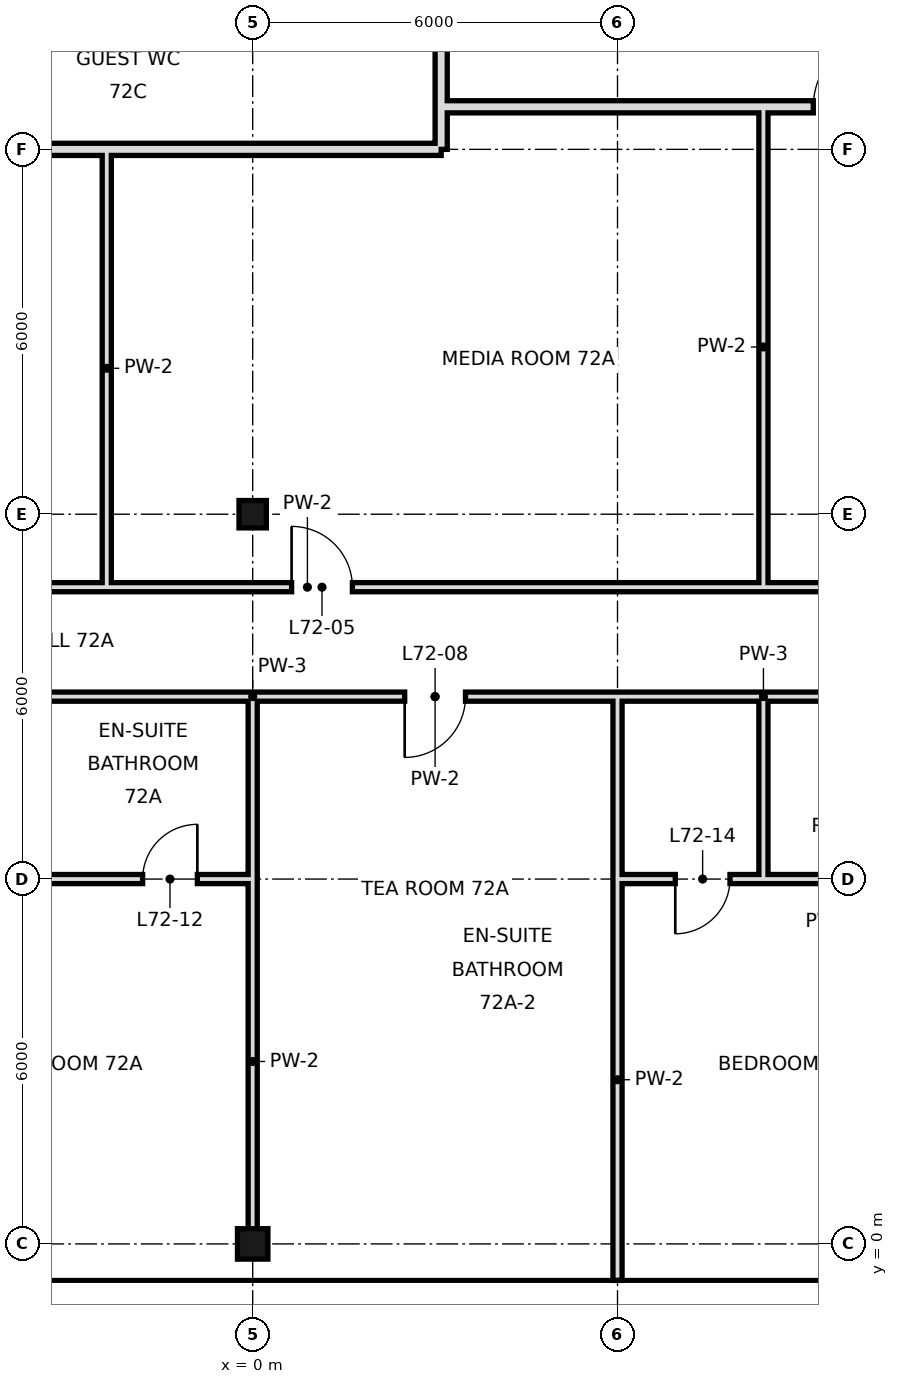
"""IFC4 building model, lengths in metres.
Left out: names, types, materials, properties, quantities, classifications, styles, units other than length and angle.
Written with IfcOpenShell. Run it as: python <this file> out.ifc"""

import sys

from ifc_helpers import new_model, si_unit, direction, frame, frame_2d, origin, origin_with_axes, origin_2d, place, context, subcontext, project, spatial, rectangle, hollow_rectangle, extrude, element, fill, save


model = new_model("IFC4")
c1 = context("Model", 3, precision=1e-05, world=origin(), true_north=direction((0.0, 1.0)))
c2 = subcontext(c1, "Body", "Model", "MODEL_VIEW")
j1 = project(units=[si_unit("LENGTHUNIT", "METRE"), si_unit("PLANEANGLEUNIT", "RADIAN")], contexts=[c1])
p1 = place(None, origin())
s1 = spatial("IfcSite", under=j1, at=p1, CompositionType="ELEMENT")
p2 = place(p1, origin())
s2 = spatial("IfcBuilding", under=s1, at=p2, CompositionType="ELEMENT")
p3 = place(p2, frame((0.0, 0.0, 305.2)))
s3 = spatial("IfcBuildingStorey", under=s2, at=p3, CompositionType="ELEMENT", Elevation=305.2)
p4 = place(p3, origin_with_axes())
e1 = element("IfcColumn", 1, at=p4, inside=s3, PredefinedType="COLUMN", context=c2, shape_type="SweptSolid", body=[
    extrude(hollow_rectangle(XDim=0.5, YDim=0.5, WallThickness=0.025, at=origin_2d()), origin(), (0.0, 0.0, 1.0), 3.6),
])
p5 = place(p3, frame((0.0, 12.0, 0.0), z_axis=(0.0, 0.0, 1.0), x_axis=(1.0, 0.0, 0.0)))
e2 = element("IfcColumn", 2, at=p5, inside=s3, PredefinedType="COLUMN", context=c2, shape_type="SweptSolid", body=[
    extrude(hollow_rectangle(XDim=0.45, YDim=0.45, WallThickness=0.022, at=origin_2d()), origin(), (0.0, 0.0, 1.0), 3.6),
])
p6 = place(p3, frame((-2.4, 10.8, 0.0), z_axis=(0.0, 0.0, 1.0), x_axis=(0.0, 1.0, 0.0)))
e3 = element("IfcWall", 3, at=p6, inside=s3, PredefinedType="PARTITIONING", context=c2, shape_type="SweptSolid", body=[
    extrude(rectangle(XDim=7.2, YDim=0.15, at=frame_2d((3.6, 0.0))), origin(), (0.0, 0.0, 1.0), 3.42),
])
p7 = place(p3, frame((0.0, 0.0, 0.0), z_axis=(0.0, 0.0, 1.0), x_axis=(0.0, 1.0, 0.0)))
e4 = element("IfcWall", 4, at=p7, inside=s3, PredefinedType="PARTITIONING", context=c2, shape_type="SweptSolid", body=[
    extrude(rectangle(XDim=6.0, YDim=0.15, at=frame_2d((3.0, 0.0))), origin(), (0.0, 0.0, 1.0), 2.72),
])
p8 = place(p3, frame((0.0, 6.0, 0.0), z_axis=(0.0, 0.0, 1.0), x_axis=(0.0, 1.0, 0.0)))
e5 = element("IfcWall", 5, at=p8, inside=s3, PredefinedType="PARTITIONING", context=c2, shape_type="SweptSolid", body=[
    extrude(rectangle(XDim=3.0, YDim=0.15, at=frame_2d((1.5, 0.0))), origin(), (0.0, 0.0, 1.0), 2.72),
])
p9 = place(p3, frame((3.1, 18.7, 0.0), z_axis=(0.0, 0.0, 1.0), x_axis=(0.0, 1.0, 0.0)))
e6 = element("IfcWall", 6, at=p9, inside=s3, PredefinedType="SOLIDWALL", context=c2, shape_type="SweptSolid", body=[
    extrude(rectangle(XDim=1.7, YDim=0.2, at=frame_2d((0.85, 0.0))), origin(), (0.0, 0.0, 1.0), 3.42),
])
p10 = place(p3, frame((3.1, 18.0, 0.0), z_axis=(0.0, 0.0, 1.0), x_axis=(0.0, 1.0, 0.0)))
e7 = element("IfcWall", 7, at=p10, inside=s3, PredefinedType="SOLIDWALL", context=c2, shape_type="SweptSolid", body=[
    extrude(rectangle(XDim=0.7, YDim=0.2, at=frame_2d((0.35, 0.0))), origin(), (0.0, 0.0, 1.0), 2.97),
])
p11 = place(p3, frame((6.0, -0.6, 0.0), z_axis=(0.0, 0.0, 1.0), x_axis=(0.0, 1.0, 0.0)))
e8 = element("IfcWall", 8, at=p11, inside=s3, PredefinedType="PARTITIONING", context=c2, shape_type="SweptSolid", body=[
    extrude(rectangle(XDim=6.6, YDim=0.15, at=frame_2d((3.3, 0.0))), origin(), (0.0, 0.0, 1.0), 2.72),
])
p12 = place(p3, frame((6.0, 6.0, 0.0), z_axis=(0.0, 0.0, 1.0), x_axis=(0.0, 1.0, 0.0)))
e9 = element("IfcWall", 9, at=p12, inside=s3, PredefinedType="PARTITIONING", context=c2, shape_type="SweptSolid", body=[
    extrude(rectangle(XDim=3.0, YDim=0.15, at=frame_2d((1.5, 0.0))), origin(), (0.0, 0.0, 1.0), 2.72),
])
p13 = place(p3, frame((8.4, 10.8, 0.0), z_axis=(0.0, 0.0, 1.0), x_axis=(0.0, 1.0, 0.0)))
e10 = element("IfcWall", 10, at=p13, inside=s3, PredefinedType="PARTITIONING", context=c2, shape_type="SweptSolid", body=[
    extrude(rectangle(XDim=7.9, YDim=0.15, at=frame_2d((3.95, 0.0))), origin(), (0.0, 0.0, 1.0), 3.42),
])
p14 = place(p3, frame((8.4, 6.0, 0.0), z_axis=(0.0, 0.0, 1.0), x_axis=(0.0, 1.0, 0.0)))
e11 = element("IfcWall", 11, at=p14, inside=s3, PredefinedType="PARTITIONING", context=c2, shape_type="SweptSolid", body=[
    extrude(rectangle(XDim=3.0, YDim=0.15, at=frame_2d((1.5, 0.0))), origin(), (0.0, 0.0, 1.0), 3.42),
])
p15 = place(p3, frame((-10.2, 10.8, 0.0), z_axis=(0.0, 0.0, 1.0), x_axis=(1.0, 0.0, 0.0)))
e12 = element("IfcWall", 12, at=p15, inside=s3, PredefinedType="PARTITIONING", context=c2, shape_type="SweptSolid", body=[
    extrude(rectangle(XDim=22.2, YDim=0.15, at=frame_2d((11.1, 0.0))), origin(), (0.0, 0.0, 1.0), 3.42),
])
p16 = place(p15, frame((20.32, 0.0, 0.0)))
e13 = element("IfcOpeningElement", 13, at=p16, cuts=e12, PredefinedType="OPENING", context=c2, shape_type="SweptSolid", body=[
    extrude(rectangle(XDim=1.0, YDim=2.4, at=frame_2d((0.5, 1.2))), frame((0.0, 0.085, 0.0), z_axis=(0.0, -1.0, 0.0), x_axis=(1.0, 0.0, 0.0)), (0.0, 0.0, 1.0), 0.17),
])
p17 = place(p15, frame((3.4, 0.0, 0.0)))
e14 = element("IfcOpeningElement", 14, at=p17, cuts=e12, PredefinedType="OPENING", context=c2, shape_type="SweptSolid", body=[
    extrude(rectangle(XDim=1.0, YDim=2.4, at=frame_2d((0.5, 1.2))), frame((0.0, 0.085, 0.0), z_axis=(0.0, -1.0, 0.0), x_axis=(1.0, 0.0, 0.0)), (0.0, 0.0, 1.0), 0.17),
])
p18 = place(p15, frame((10.84, 0.0, 0.0)))
e15 = element("IfcOpeningElement", 15, at=p18, cuts=e12, PredefinedType="OPENING", context=c2, shape_type="SweptSolid", body=[
    extrude(rectangle(XDim=1.0, YDim=2.4, at=frame_2d((0.5, 1.2))), frame((0.0, 0.085, 0.0), z_axis=(0.0, -1.0, 0.0), x_axis=(1.0, 0.0, 0.0)), (0.0, 0.0, 1.0), 0.17),
])
p19 = place(p3, frame((-12.6, 18.0, 0.0), z_axis=(0.0, 0.0, 1.0), x_axis=(1.0, 0.0, 0.0)))
e16 = element("IfcWall", 16, at=p19, inside=s3, PredefinedType="SOLIDWALL", context=c2, shape_type="SweptSolid", body=[
    extrude(rectangle(XDim=15.7, YDim=0.2, at=frame_2d((7.85, 0.0))), origin(), (0.0, 0.0, 1.0), 2.72),
])
p20 = place(p3, frame((3.1, 18.7, 0.0), z_axis=(0.0, 0.0, 1.0), x_axis=(1.0, 0.0, 0.0)))
e17 = element("IfcWall", 17, at=p20, inside=s3, PredefinedType="SOLIDWALL", context=c2, shape_type="SweptSolid", body=[
    extrude(rectangle(XDim=17.3, YDim=0.2, at=frame_2d((8.65, 0.0))), origin(), (0.0, 0.0, 1.0), 2.72),
])
p21 = place(p20, frame((6.12, 0.0, 0.0)))
e18 = element("IfcOpeningElement", 18, at=p21, cuts=e17, PredefinedType="OPENING", context=c2, shape_type="SweptSolid", body=[
    extrude(rectangle(XDim=1.2, YDim=2.4, at=frame_2d((0.6, 1.2))), frame((0.0, 0.11, 0.0), z_axis=(0.0, -1.0, 0.0), x_axis=(1.0, 0.0, 0.0)), (0.0, 0.0, 1.0), 0.22),
])
p22 = place(p20, frame((13.7, 0.0, 0.0)))
e19 = element("IfcOpeningElement", 19, at=p22, cuts=e17, PredefinedType="OPENING", context=c2, shape_type="SweptSolid", body=[
    extrude(rectangle(XDim=1.2, YDim=2.4, at=frame_2d((0.6, 1.2))), frame((0.0, 0.11, 0.0), z_axis=(0.0, -1.0, 0.0), x_axis=(1.0, 0.0, 0.0)), (0.0, 0.0, 1.0), 0.22),
])
p23 = place(p3, frame((8.4, 6.0, 0.0), z_axis=(0.0, 0.0, 1.0), x_axis=(1.0, 0.0, 0.0)))
e20 = element("IfcWall", 20, at=p23, inside=s3, PredefinedType="PARTITIONING", context=c2, shape_type="SweptSolid", body=[
    extrude(rectangle(XDim=3.6, YDim=0.15, at=frame_2d((1.8, 0.0))), origin(), (0.0, 0.0, 1.0), 2.97),
])
p24 = place(p23, frame((1.72, 0.0, 0.0)))
e21 = element("IfcOpeningElement", 21, at=p24, cuts=e20, PredefinedType="OPENING", context=c2, shape_type="SweptSolid", body=[
    extrude(rectangle(XDim=1.0, YDim=2.4, at=frame_2d((0.5, 1.2))), frame((0.0, 0.085, 0.0), z_axis=(0.0, -1.0, 0.0), x_axis=(1.0, 0.0, 0.0)), (0.0, 0.0, 1.0), 0.17),
])
p25 = place(p3, frame((-3.6, 6.0, 0.0), z_axis=(0.0, 0.0, 1.0), x_axis=(1.0, 0.0, 0.0)))
e22 = element("IfcWall", 22, at=p25, inside=s3, PredefinedType="PARTITIONING", context=c2, shape_type="SweptSolid", body=[
    extrude(rectangle(XDim=3.6, YDim=0.15, at=frame_2d((1.8, 0.0))), origin(), (0.0, 0.0, 1.0), 2.72),
])
p26 = place(p25, frame((1.79, 0.0, 0.0)))
e23 = element("IfcOpeningElement", 23, at=p26, cuts=e22, PredefinedType="OPENING", context=c2, shape_type="SweptSolid", body=[
    extrude(rectangle(XDim=0.9, YDim=2.4, at=frame_2d((0.45, 1.2))), frame((0.0, 0.085, 0.0), z_axis=(0.0, -1.0, 0.0), x_axis=(1.0, 0.0, 0.0)), (0.0, 0.0, 1.0), 0.17),
])
p27 = place(p3, frame((6.0, 6.0, 0.0), z_axis=(0.0, 0.0, 1.0), x_axis=(1.0, 0.0, 0.0)))
e24 = element("IfcWall", 24, at=p27, inside=s3, PredefinedType="PARTITIONING", context=c2, shape_type="SweptSolid", body=[
    extrude(rectangle(XDim=2.4, YDim=0.15, at=frame_2d((1.2, 0.0))), origin(), (0.0, 0.0, 1.0), 2.97),
])
p28 = place(p27, frame((0.95, 0.0, 0.0)))
e25 = element("IfcOpeningElement", 25, at=p28, cuts=e24, PredefinedType="OPENING", context=c2, shape_type="SweptSolid", body=[
    extrude(rectangle(XDim=0.9, YDim=2.4, at=frame_2d((0.45, 1.2))), frame((0.0, 0.085, 0.0), z_axis=(0.0, -1.0, 0.0), x_axis=(1.0, 0.0, 0.0)), (0.0, 0.0, 1.0), 0.17),
])
p29 = place(p3, frame((0.0, 9.0, 0.0), z_axis=(0.0, 0.0, 1.0), x_axis=(1.0, 0.0, 0.0)))
e26 = element("IfcWall", 26, at=p29, inside=s3, PredefinedType="PARTITIONING", context=c2, shape_type="SweptSolid", body=[
    extrude(rectangle(XDim=6.0, YDim=0.15, at=frame_2d((3.0, 0.0))), origin(), (0.0, 0.0, 1.0), 3.42),
])
p30 = place(p29, frame((2.5, 0.0, 0.0)))
e27 = element("IfcOpeningElement", 27, at=p30, cuts=e26, PredefinedType="OPENING", context=c2, shape_type="SweptSolid", body=[
    extrude(rectangle(XDim=1.0, YDim=2.4, at=frame_2d((0.5, 1.2))), frame((0.0, 0.085, 0.0), z_axis=(0.0, -1.0, 0.0), x_axis=(1.0, 0.0, 0.0)), (0.0, 0.0, 1.0), 0.17),
])
p31 = place(p3, frame((8.4, 9.0, 0.0), z_axis=(0.0, 0.0, 1.0), x_axis=(1.0, 0.0, 0.0)))
e28 = element("IfcWall", 28, at=p31, inside=s3, PredefinedType="PARTITIONING", context=c2, shape_type="SweptSolid", body=[
    extrude(rectangle(XDim=9.6, YDim=0.15, at=frame_2d((4.8, 0.0))), origin(), (0.0, 0.0, 1.0), 3.42),
])
p32 = place(p31, frame((1.72, 0.0, 0.0)))
e29 = element("IfcOpeningElement", 29, at=p32, cuts=e28, PredefinedType="OPENING", context=c2, shape_type="SweptSolid", body=[
    extrude(rectangle(XDim=1.0, YDim=2.4, at=frame_2d((0.5, 1.2))), frame((0.0, 0.085, 0.0), z_axis=(0.0, -1.0, 0.0), x_axis=(1.0, 0.0, 0.0)), (0.0, 0.0, 1.0), 0.17),
])
p33 = place(p31, frame((5.2, 0.0, 0.0)))
e30 = element("IfcOpeningElement", 30, at=p33, cuts=e28, PredefinedType="OPENING", context=c2, shape_type="SweptSolid", body=[
    extrude(rectangle(XDim=1.0, YDim=2.4, at=frame_2d((0.5, 1.2))), frame((0.0, 0.085, 0.0), z_axis=(0.0, -1.0, 0.0), x_axis=(1.0, 0.0, 0.0)), (0.0, 0.0, 1.0), 0.17),
])
p34 = place(p3, frame((-3.6, 9.0, 0.0), z_axis=(0.0, 0.0, 1.0), x_axis=(1.0, 0.0, 0.0)))
e31 = element("IfcWall", 31, at=p34, inside=s3, PredefinedType="PARTITIONING", context=c2, shape_type="SweptSolid", body=[
    extrude(rectangle(XDim=3.6, YDim=0.15, at=frame_2d((1.8, 0.0))), origin(), (0.0, 0.0, 1.0), 3.42),
])
p35 = place(p3, frame((6.0, 9.0, 0.0), z_axis=(0.0, 0.0, 1.0), x_axis=(1.0, 0.0, 0.0)))
e32 = element("IfcWall", 32, at=p35, inside=s3, PredefinedType="PARTITIONING", context=c2, shape_type="SweptSolid", body=[
    extrude(rectangle(XDim=2.4, YDim=0.15, at=frame_2d((1.2, 0.0))), origin(), (0.0, 0.0, 1.0), 3.42),
])
p36 = place(p18, origin())
e33 = element("IfcDoor", 33, at=p36, inside=s3, OperationType="SINGLE_SWING_LEFT", PredefinedType="DOOR", context=c2, shape_type="SweptSolid", body=[
    extrude(rectangle(XDim=1.0, YDim=2.4, at=frame_2d((0.5, 1.2))), frame((0.0, 0.025, 0.0), z_axis=(0.0, -1.0, 0.0), x_axis=(1.0, 0.0, 0.0)), (0.0, 0.0, 1.0), 0.05),
])
fill(e15, e33)
p37 = place(p30, frame((1.0, 0.0, 0.0), z_axis=(0.0, 0.0, 1.0), x_axis=(-1.0, 0.0, 0.0)))
e34 = element("IfcDoor", 34, at=p37, inside=s3, OperationType="SINGLE_SWING_RIGHT", PredefinedType="DOOR", context=c2, shape_type="SweptSolid", body=[
    extrude(rectangle(XDim=1.0, YDim=2.4, at=frame_2d((0.5, 1.2))), frame((0.0, 0.025, 0.0), z_axis=(0.0, -1.0, 0.0), x_axis=(1.0, 0.0, 0.0)), (0.0, 0.0, 1.0), 0.05),
])
fill(e27, e34)
p38 = place(p26, frame((0.9, 0.0, 0.0), z_axis=(0.0, 0.0, 1.0), x_axis=(-1.0, 0.0, 0.0)))
e35 = element("IfcDoor", 35, at=p38, inside=s3, OperationType="SINGLE_SWING_LEFT", PredefinedType="DOOR", context=c2, shape_type="SweptSolid", body=[
    extrude(rectangle(XDim=0.9, YDim=2.4, at=frame_2d((0.45, 1.2))), frame((0.0, 0.025, 0.0), z_axis=(0.0, -1.0, 0.0), x_axis=(1.0, 0.0, 0.0)), (0.0, 0.0, 1.0), 0.05),
])
fill(e23, e35)
p39 = place(p28, frame((0.9, 0.0, 0.0), z_axis=(0.0, 0.0, 1.0), x_axis=(-1.0, 0.0, 0.0)))
e36 = element("IfcDoor", 36, at=p39, inside=s3, OperationType="SINGLE_SWING_RIGHT", PredefinedType="DOOR", context=c2, shape_type="SweptSolid", body=[
    extrude(rectangle(XDim=0.9, YDim=2.4, at=frame_2d((0.45, 1.2))), frame((0.0, 0.025, 0.0), z_axis=(0.0, -1.0, 0.0), x_axis=(1.0, 0.0, 0.0)), (0.0, 0.0, 1.0), 0.05),
])
fill(e25, e36)
p40 = place(p21, frame((1.2, 0.0, 0.0), z_axis=(0.0, 0.0, 1.0), x_axis=(-1.0, 0.0, 0.0)))
e37 = element("IfcDoor", 37, at=p40, inside=s3, OperationType="SINGLE_SWING_LEFT", PredefinedType="DOOR", context=c2, shape_type="SweptSolid", body=[
    extrude(rectangle(XDim=1.2, YDim=2.4, at=frame_2d((0.6, 1.2))), frame((0.0, 0.025, 0.0), z_axis=(0.0, -1.0, 0.0), x_axis=(1.0, 0.0, 0.0)), (0.0, 0.0, 1.0), 0.05),
])
fill(e18, e37)
save(model, sys.argv[1])
